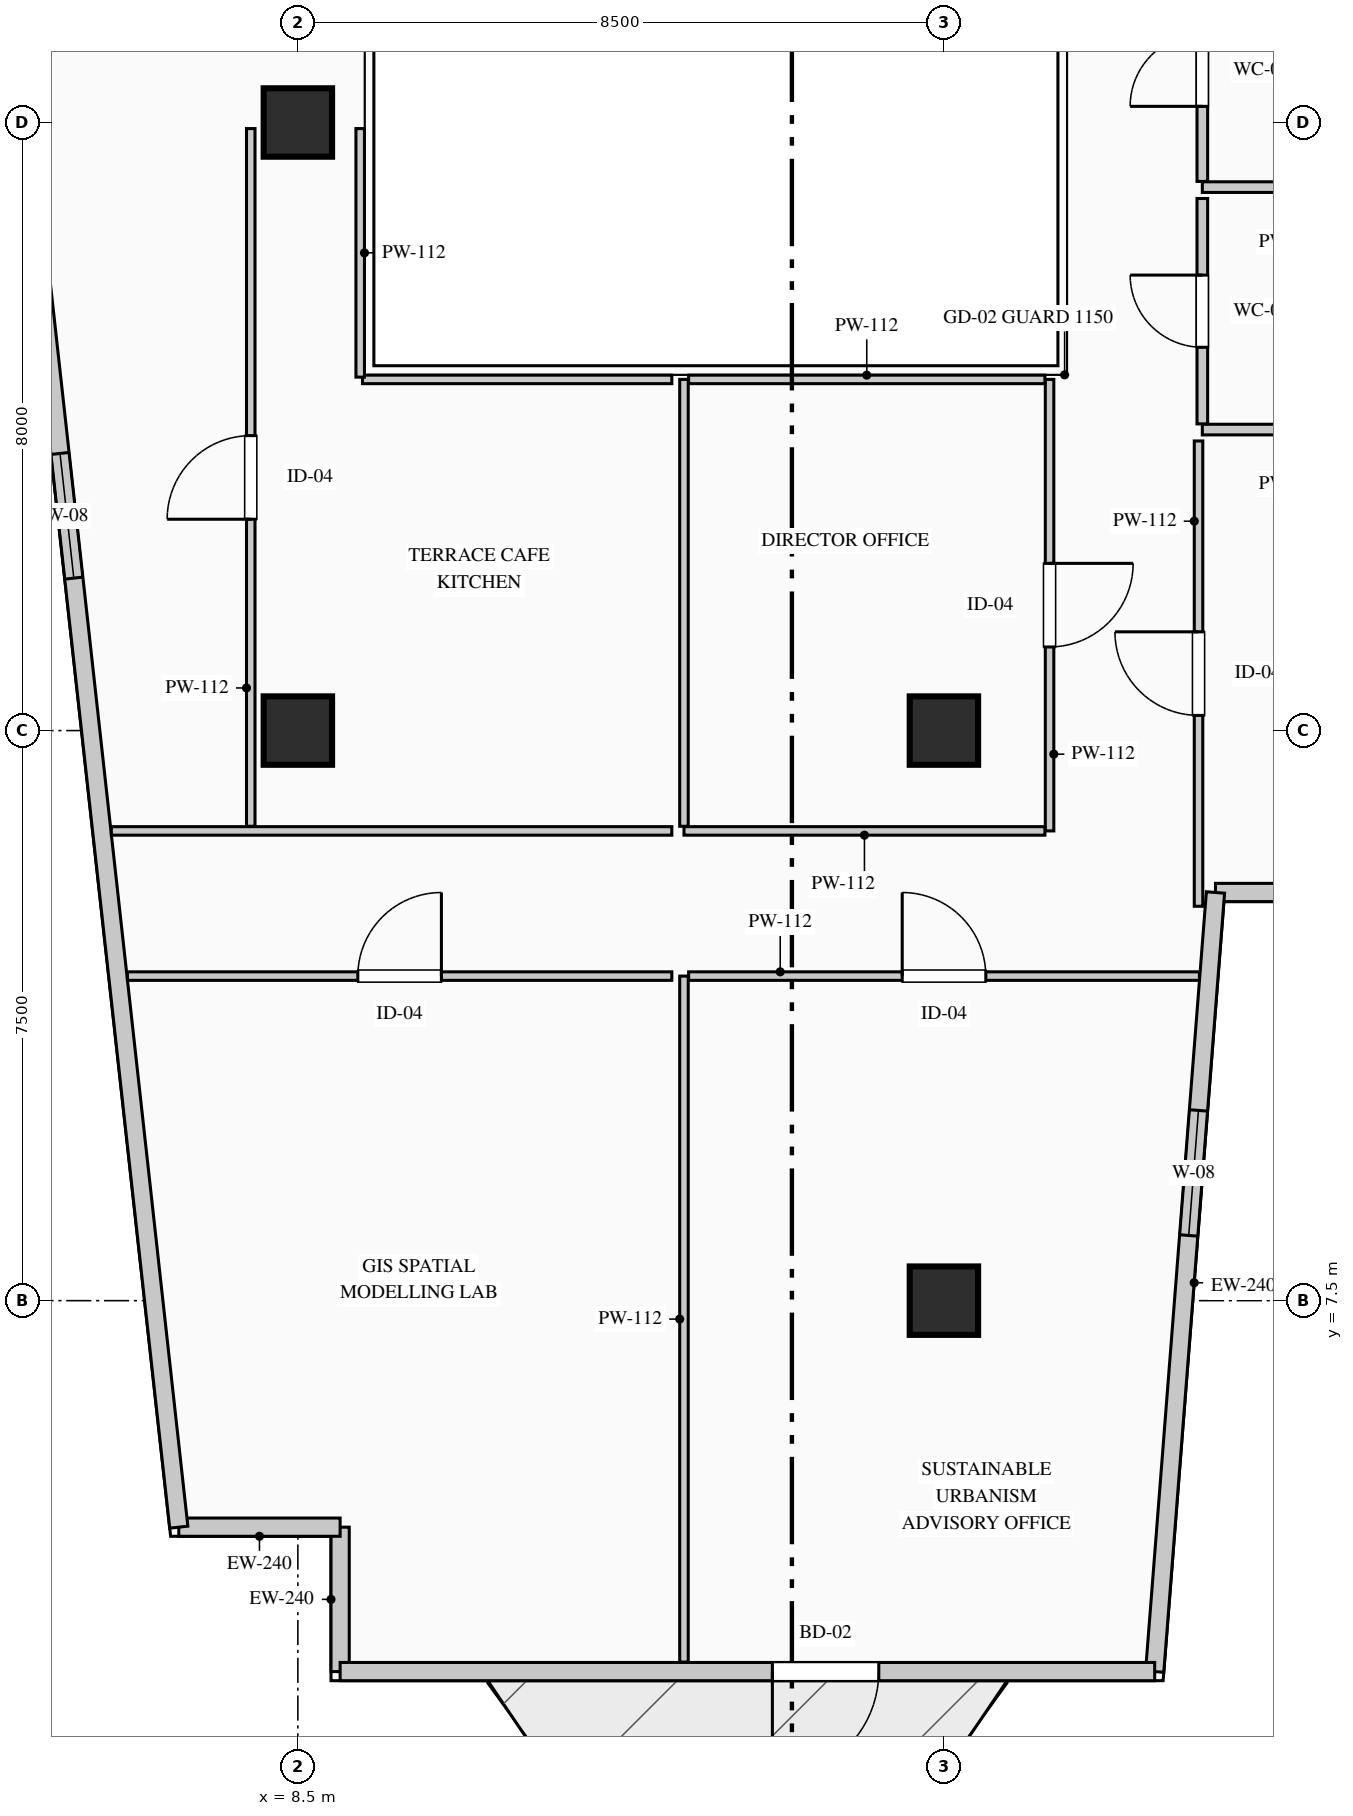
"""IFC4 building model, lengths in metres.
Left out: names, types, materials, properties, quantities, classifications, styles, units other than length and angle.
Written with IfcOpenShell. Run it as: python <this file> out.ifc"""

import sys

from ifc_helpers import new_model, si_unit, direction, frame, frame_2d, origin, origin_2d, place, context, subcontext, project, spatial, rectangle, extrude, element, fill, save


model = new_model("IFC4")
c1 = context("Model", 3, precision=1e-05, world=origin(), true_north=direction((0.0, 1.0)))
c2 = subcontext(c1, "Body", "Model", "MODEL_VIEW")
j1 = project(units=[si_unit("LENGTHUNIT", "METRE"), si_unit("PLANEANGLEUNIT", "RADIAN")], contexts=[c1])
p1 = place(None, origin())
s1 = spatial("IfcSite", under=j1, at=p1, CompositionType="ELEMENT")
p2 = place(p1, origin())
s2 = spatial("IfcBuilding", under=s1, at=p2, CompositionType="ELEMENT")
p3 = place(p2, frame((0.0, 0.0, 246.95)))
s3 = spatial("IfcBuildingStorey", under=s2, at=p3, CompositionType="ELEMENT", Elevation=246.95)
for number, where, z_axis, x_axis in (
    (1, (8.5, 15.0, 0.0), (0.0, 0.0, 1.0), (1.0, 0.0, 0.0)),
    (2, (8.5, 23.0, 0.0), (0.0, 0.0, 1.0), (1.0, 0.0, 0.0)),
    (3, (17.0, 7.5, 0.0), (0.0, 0.0, 1.0), (1.0, 0.0, 0.0)),
    (4, (17.0, 15.0, 0.0), (0.0, 0.0, 1.0), (1.0, 0.0, 0.0)),
):
    element("IfcColumn", number, at=place(p3, frame(where, z_axis=z_axis, x_axis=x_axis)), inside=s3, PredefinedType="COLUMN", context=c2, shape_type="SweptSolid", body=[
        extrude(rectangle(XDim=0.9, YDim=0.9, at=origin_2d()), origin(), (0.0, 0.0, 1.0), 3.95),
    ])
p4 = place(p3, frame((9.056, 2.62, 0.0), z_axis=(0.0, 0.0, 1.0), x_axis=(0.0, 1.0, 0.0)))
e5 = element("IfcWall", 5, at=p4, inside=s3, PredefinedType="STANDARD", context=c2, shape_type="SweptSolid", body=[
    extrude(rectangle(XDim=1.9, YDim=0.24, at=frame_2d((0.95, 0.0))), origin(), (0.0, 0.0, 1.0), 3.6),
])
p5 = place(p3, frame((9.056, 4.52, 0.0), z_axis=(0.0, 0.0, 1.0), x_axis=(-1.0, 0.0, 0.0)))
e6 = element("IfcWall", 6, at=p5, inside=s3, PredefinedType="STANDARD", context=c2, shape_type="SweptSolid", body=[
    extrude(rectangle(XDim=2.123, YDim=0.24, at=frame_2d((1.061, 0.0))), origin(), (0.0, 0.0, 1.0), 3.6),
])
p6 = place(p3, frame((6.933, 4.52, 0.0), z_axis=(0.0, 0.0, 1.0), x_axis=(-0.109965284523, 0.993935428587, 0.0)))
e7 = element("IfcWall", 7, at=p6, inside=s3, PredefinedType="STANDARD", context=c2, shape_type="SweptSolid", body=[
    extrude(rectangle(XDim=37.186, YDim=0.24, at=frame_2d((18.593, 0.0))), origin(), (0.0, 0.0, 1.0), 3.6),
])
p7 = place(p6, frame((12.562, 0.0, 0.9)))
e8 = element("IfcOpeningElement", 8, at=p7, cuts=e7, PredefinedType="OPENING", context=c2, shape_type="SweptSolid", body=[
    extrude(rectangle(XDim=1.65, YDim=1.95, at=frame_2d((0.825, 0.975))), frame((0.0, 0.13, 0.0), z_axis=(0.0, -1.0, 0.0), x_axis=(1.0, 0.0, 0.0)), (0.0, 0.0, 1.0), 0.26),
])
p8 = place(p3, frame((26.495, 12.87, 0.0), z_axis=(0.0, 0.0, 1.0), x_axis=(-1.0, 0.0, 0.0)))
e9 = element("IfcWall", 9, at=p8, inside=s3, PredefinedType="STANDARD", context=c2, shape_type="SweptSolid", body=[
    extrude(rectangle(XDim=5.922, YDim=0.24, at=frame_2d((2.961, 0.0))), origin(), (0.0, 0.0, 1.0), 3.6),
])
p9 = place(p3, frame((20.573, 12.87, 0.0), z_axis=(0.0, 0.0, 1.0), x_axis=(-0.077816860153, -0.996967670627, 0.0)))
e10 = element("IfcWall", 10, at=p9, inside=s3, PredefinedType="STANDARD", context=c2, shape_type="SweptSolid", body=[
    extrude(rectangle(XDim=10.281, YDim=0.24, at=frame_2d((5.141, 0.0))), origin(), (0.0, 0.0, 1.0), 3.6),
])
p10 = place(p9, frame((2.876, 0.0, 0.9)))
e11 = element("IfcOpeningElement", 11, at=p10, cuts=e10, PredefinedType="OPENING", context=c2, shape_type="SweptSolid", body=[
    extrude(rectangle(XDim=1.65, YDim=1.95, at=frame_2d((0.825, 0.975))), frame((0.0, 0.13, 0.0), z_axis=(0.0, -1.0, 0.0), x_axis=(1.0, 0.0, 0.0)), (0.0, 0.0, 1.0), 0.26),
])
p11 = place(p3, frame((19.773, 2.62, 0.0), z_axis=(0.0, 0.0, 1.0), x_axis=(-1.0, 0.0, 0.0)))
e12 = element("IfcWall", 12, at=p11, inside=s3, PredefinedType="STANDARD", context=c2, shape_type="SweptSolid", body=[
    extrude(rectangle(XDim=10.717, YDim=0.24, at=frame_2d((5.358, 0.0))), origin(), (0.0, 0.0, 1.0), 3.6),
])
p12 = place(p11, frame((3.63, 0.0, 0.0)))
e13 = element("IfcOpeningElement", 13, at=p12, cuts=e12, PredefinedType="OPENING", context=c2, shape_type="SweptSolid", body=[
    extrude(rectangle(XDim=1.4, YDim=2.2, at=frame_2d((0.7, 1.1))), frame((0.0, 0.13, 0.0), z_axis=(0.0, -1.0, 0.0), x_axis=(1.0, 0.0, 0.0)), (0.0, 0.0, 1.0), 0.26),
])
p13 = place(p3, frame((22.725, 22.15, 0.0), z_axis=(0.0, 0.0, 1.0), x_axis=(-1.0, 0.0, 0.0)))
e14 = element("IfcWall", 14, at=p13, inside=s3, PredefinedType="PARTITIONING", context=c2, shape_type="SweptSolid", body=[
    extrude(rectangle(XDim=2.325, YDim=0.14, at=frame_2d((1.163, 0.0))), origin(), (0.0, 0.0, 1.0), 3.6),
])
p14 = place(p3, frame((20.4, 22.225, 0.0), z_axis=(0.0, 0.0, 1.0), x_axis=(0.0, 1.0, 0.0)))
e15 = element("IfcWall", 15, at=p14, inside=s3, PredefinedType="PARTITIONING", context=c2, shape_type="SweptSolid", body=[
    extrude(rectangle(XDim=2.925, YDim=0.14, at=frame_2d((1.462, 0.0))), origin(), (0.0, 0.0, 1.0), 3.6),
])
p15 = place(p14, frame((0.988, 0.0, 0.0)))
e16 = element("IfcOpeningElement", 16, at=p15, cuts=e15, PredefinedType="OPENING", context=c2, shape_type="SweptSolid", body=[
    extrude(rectangle(XDim=0.95, YDim=2.15, at=frame_2d((0.475, 1.075))), frame((0.0, 0.08, 0.0), z_axis=(0.0, -1.0, 0.0), x_axis=(1.0, 0.0, 0.0)), (0.0, 0.0, 1.0), 0.16),
])
p16 = place(p3, frame((22.725, 18.96, 0.0), z_axis=(0.0, 0.0, 1.0), x_axis=(-1.0, 0.0, 0.0)))
e17 = element("IfcWall", 17, at=p16, inside=s3, PredefinedType="PARTITIONING", context=c2, shape_type="SweptSolid", body=[
    extrude(rectangle(XDim=2.325, YDim=0.14, at=frame_2d((1.163, 0.0))), origin(), (0.0, 0.0, 1.0), 3.6),
])
p17 = place(p3, frame((20.4, 19.035, 0.0), z_axis=(0.0, 0.0, 1.0), x_axis=(0.0, 1.0, 0.0)))
e18 = element("IfcWall", 18, at=p17, inside=s3, PredefinedType="PARTITIONING", context=c2, shape_type="SweptSolid", body=[
    extrude(rectangle(XDim=2.965, YDim=0.14, at=frame_2d((1.482, 0.0))), origin(), (0.0, 0.0, 1.0), 3.6),
])
p18 = place(p17, frame((1.008, 0.0, 0.0)))
e19 = element("IfcOpeningElement", 19, at=p18, cuts=e18, PredefinedType="OPENING", context=c2, shape_type="SweptSolid", body=[
    extrude(rectangle(XDim=0.95, YDim=2.15, at=frame_2d((0.475, 1.075))), frame((0.0, 0.08, 0.0), z_axis=(0.0, -1.0, 0.0), x_axis=(1.0, 0.0, 0.0)), (0.0, 0.0, 1.0), 0.16),
])
p19 = place(p3, frame((13.58, 2.745, 0.0), z_axis=(0.0, 0.0, 1.0), x_axis=(0.0, 1.0, 0.0)))
e20 = element("IfcWall", 20, at=p19, inside=s3, PredefinedType="PARTITIONING", context=c2, shape_type="SweptSolid", body=[
    extrude(rectangle(XDim=9.025, YDim=0.112, at=frame_2d((4.512, 0.0))), origin(), (0.0, 0.0, 1.0), 3.6),
])
p20 = place(p3, frame((13.641, 11.77, 0.0), z_axis=(0.0, 0.0, 1.0), x_axis=(1.0, 0.0, 0.0)))
e21 = element("IfcWall", 21, at=p20, inside=s3, PredefinedType="PARTITIONING", context=c2, shape_type="SweptSolid", body=[
    extrude(rectangle(XDim=6.721, YDim=0.112, at=frame_2d((3.36, 0.0))), origin(), (0.0, 0.0, 1.0), 3.6),
])
p21 = place(p20, frame((2.81, 0.0, 0.0)))
e22 = element("IfcOpeningElement", 22, at=p21, cuts=e21, PredefinedType="OPENING", context=c2, shape_type="SweptSolid", body=[
    extrude(rectangle(XDim=1.1, YDim=2.2, at=frame_2d((0.55, 1.1))), frame((0.0, 0.066, 0.0), z_axis=(0.0, -1.0, 0.0), x_axis=(1.0, 0.0, 0.0)), (0.0, 0.0, 1.0), 0.132),
])
p22 = place(p3, frame((6.257, 11.77, 0.0), z_axis=(0.0, 0.0, 1.0), x_axis=(1.0, 0.0, 0.0)))
e23 = element("IfcWall", 23, at=p22, inside=s3, PredefinedType="PARTITIONING", context=c2, shape_type="SweptSolid", body=[
    extrude(rectangle(XDim=7.163, YDim=0.112, at=frame_2d((3.582, 0.0))), origin(), (0.0, 0.0, 1.0), 3.6),
])
p23 = place(p22, frame((3.031, 0.0, 0.0)))
e24 = element("IfcOpeningElement", 24, at=p23, cuts=e23, PredefinedType="OPENING", context=c2, shape_type="SweptSolid", body=[
    extrude(rectangle(XDim=1.1, YDim=2.2, at=frame_2d((0.55, 1.1))), frame((0.0, 0.066, 0.0), z_axis=(0.0, -1.0, 0.0), x_axis=(1.0, 0.0, 0.0)), (0.0, 0.0, 1.0), 0.132),
])
p24 = place(p3, frame((18.39, 19.62, 0.0), z_axis=(0.0, 0.0, 1.0), x_axis=(0.0, -1.0, 0.0)))
e25 = element("IfcWall", 25, at=p24, inside=s3, PredefinedType="PARTITIONING", context=c2, shape_type="SweptSolid", body=[
    extrude(rectangle(XDim=5.94, YDim=0.112, at=frame_2d((2.97, 0.0))), origin(), (0.0, 0.0, 1.0), 3.6),
])
p25 = place(p24, frame((2.42, 0.0, 0.0)))
e26 = element("IfcOpeningElement", 26, at=p25, cuts=e25, PredefinedType="OPENING", context=c2, shape_type="SweptSolid", body=[
    extrude(rectangle(XDim=1.1, YDim=2.2, at=frame_2d((0.55, 1.1))), frame((0.0, 0.066, 0.0), z_axis=(0.0, -1.0, 0.0), x_axis=(1.0, 0.0, 0.0)), (0.0, 0.0, 1.0), 0.132),
])
p26 = place(p3, frame((18.329, 13.68, 0.0), z_axis=(0.0, 0.0, 1.0), x_axis=(-1.0, 0.0, 0.0)))
e27 = element("IfcWall", 27, at=p26, inside=s3, PredefinedType="PARTITIONING", context=c2, shape_type="SweptSolid", body=[
    extrude(rectangle(XDim=4.749, YDim=0.112, at=frame_2d((2.375, 0.0))), origin(), (0.0, 0.0, 1.0), 3.6),
])
p27 = place(p3, frame((13.58, 13.741, 0.0), z_axis=(0.0, 0.0, 1.0), x_axis=(0.0, 1.0, 0.0)))
e28 = element("IfcWall", 28, at=p27, inside=s3, PredefinedType="PARTITIONING", context=c2, shape_type="SweptSolid", body=[
    extrude(rectangle(XDim=5.879, YDim=0.112, at=frame_2d((2.939, 0.0))), origin(), (0.0, 0.0, 1.0), 3.6),
])
p28 = place(p3, frame((13.641, 19.62, 0.0), z_axis=(0.0, 0.0, 1.0), x_axis=(1.0, 0.0, 0.0)))
e29 = element("IfcWall", 29, at=p28, inside=s3, PredefinedType="PARTITIONING", context=c2, shape_type="SweptSolid", body=[
    extrude(rectangle(XDim=4.688, YDim=0.112, at=frame_2d((2.344, 0.0))), origin(), (0.0, 0.0, 1.0), 3.6),
])
p29 = place(p3, frame((20.35, 12.689, 0.0), z_axis=(0.0, 0.0, 1.0), x_axis=(0.0, 1.0, 0.0)))
e30 = element("IfcWall", 30, at=p29, inside=s3, PredefinedType="PARTITIONING", context=c2, shape_type="SweptSolid", body=[
    extrude(rectangle(XDim=6.121, YDim=0.112, at=frame_2d((3.061, 0.0))), origin(), (0.0, 0.0, 1.0), 3.6),
])
p30 = place(p29, frame((2.511, 0.0, 0.0)))
e31 = element("IfcOpeningElement", 31, at=p30, cuts=e30, PredefinedType="OPENING", context=c2, shape_type="SweptSolid", body=[
    extrude(rectangle(XDim=1.1, YDim=2.2, at=frame_2d((0.55, 1.1))), frame((0.0, 0.066, 0.0), z_axis=(0.0, -1.0, 0.0), x_axis=(1.0, 0.0, 0.0)), (0.0, 0.0, 1.0), 0.132),
])
p31 = place(p3, frame((9.35, 19.62, 0.0), z_axis=(0.0, 0.0, 1.0), x_axis=(1.0, 0.0, 0.0)))
e32 = element("IfcWall", 32, at=p31, inside=s3, PredefinedType="PARTITIONING", context=c2, shape_type="SweptSolid", body=[
    extrude(rectangle(XDim=4.07, YDim=0.112, at=frame_2d((2.035, 0.0))), origin(), (0.0, 0.0, 1.0), 3.6),
])
p32 = place(p3, frame((13.42, 13.68, 0.0), z_axis=(0.0, 0.0, 1.0), x_axis=(-1.0, 0.0, 0.0)))
e33 = element("IfcWall", 33, at=p32, inside=s3, PredefinedType="PARTITIONING", context=c2, shape_type="SweptSolid", body=[
    extrude(rectangle(XDim=7.374, YDim=0.112, at=frame_2d((3.687, 0.0))), origin(), (0.0, 0.0, 1.0), 3.6),
])
p33 = place(p3, frame((7.88, 13.741, 0.0), z_axis=(0.0, 0.0, 1.0), x_axis=(0.0, 1.0, 0.0)))
e34 = element("IfcWall", 34, at=p33, inside=s3, PredefinedType="PARTITIONING", context=c2, shape_type="SweptSolid", body=[
    extrude(rectangle(XDim=9.179, YDim=0.112, at=frame_2d((4.589, 0.0))), origin(), (0.0, 0.0, 1.0), 3.6),
])
p34 = place(p33, frame((4.04, 0.0, 0.0)))
e35 = element("IfcOpeningElement", 35, at=p34, cuts=e34, PredefinedType="OPENING", context=c2, shape_type="SweptSolid", body=[
    extrude(rectangle(XDim=1.1, YDim=2.2, at=frame_2d((0.55, 1.1))), frame((0.0, 0.066, 0.0), z_axis=(0.0, -1.0, 0.0), x_axis=(1.0, 0.0, 0.0)), (0.0, 0.0, 1.0), 0.132),
])
p35 = place(p3, frame((9.32, 22.92, 0.0), z_axis=(0.0, 0.0, 1.0), x_axis=(0.0, -1.0, 0.0)))
e36 = element("IfcWall", 36, at=p35, inside=s3, PredefinedType="PARTITIONING", context=c2, shape_type="SweptSolid", body=[
    extrude(rectangle(XDim=3.27, YDim=0.112, at=frame_2d((1.635, 0.0))), origin(), (0.0, 0.0, 1.0), 3.285),
])
p36 = place(p7, origin())
e37 = element("IfcWindow", 37, at=p36, inside=s3, PartitioningType="SINGLE_PANEL", PredefinedType="WINDOW", context=c2, shape_type="SweptSolid", body=[
    extrude(rectangle(XDim=1.65, YDim=1.95, at=frame_2d((0.825, 0.975))), frame((0.0, 0.03, 0.0), z_axis=(0.0, -1.0, 0.0), x_axis=(1.0, 0.0, 0.0)), (0.0, 0.0, 1.0), 0.06),
])
fill(e8, e37)
p37 = place(p10, origin())
e38 = element("IfcWindow", 38, at=p37, inside=s3, PartitioningType="SINGLE_PANEL", PredefinedType="WINDOW", context=c2, shape_type="SweptSolid", body=[
    extrude(rectangle(XDim=1.65, YDim=1.95, at=frame_2d((0.825, 0.975))), frame((0.0, 0.03, 0.0), z_axis=(0.0, -1.0, 0.0), x_axis=(1.0, 0.0, 0.0)), (0.0, 0.0, 1.0), 0.06),
])
fill(e11, e38)
p38 = place(p12, origin())
e39 = element("IfcDoor", 39, at=p38, inside=s3, OperationType="SINGLE_SWING_RIGHT", PredefinedType="DOOR", context=c2, shape_type="SweptSolid", body=[
    extrude(rectangle(XDim=1.4, YDim=2.2, at=frame_2d((0.7, 1.1))), frame((0.0, 0.025, 0.0), z_axis=(0.0, -1.0, 0.0), x_axis=(1.0, 0.0, 0.0)), (0.0, 0.0, 1.0), 0.05),
])
fill(e13, e39)
p39 = place(p15, origin())
e40 = element("IfcDoor", 40, at=p39, inside=s3, OperationType="SINGLE_SWING_LEFT", PredefinedType="DOOR", context=c2, shape_type="SweptSolid", body=[
    extrude(rectangle(XDim=0.95, YDim=2.15, at=frame_2d((0.475, 1.075))), frame((0.0, 0.025, 0.0), z_axis=(0.0, -1.0, 0.0), x_axis=(1.0, 0.0, 0.0)), (0.0, 0.0, 1.0), 0.05),
])
fill(e16, e40)
p40 = place(p18, origin())
e41 = element("IfcDoor", 41, at=p40, inside=s3, OperationType="SINGLE_SWING_RIGHT", PredefinedType="DOOR", context=c2, shape_type="SweptSolid", body=[
    extrude(rectangle(XDim=0.95, YDim=2.15, at=frame_2d((0.475, 1.075))), frame((0.0, 0.025, 0.0), z_axis=(0.0, -1.0, 0.0), x_axis=(1.0, 0.0, 0.0)), (0.0, 0.0, 1.0), 0.05),
])
fill(e19, e41)
p41 = place(p21, origin())
e42 = element("IfcDoor", 42, at=p41, inside=s3, OperationType="SINGLE_SWING_LEFT", PredefinedType="DOOR", context=c2, shape_type="SweptSolid", body=[
    extrude(rectangle(XDim=1.1, YDim=2.2, at=frame_2d((0.55, 1.1))), frame((0.0, 0.025, 0.0), z_axis=(0.0, -1.0, 0.0), x_axis=(1.0, 0.0, 0.0)), (0.0, 0.0, 1.0), 0.05),
])
fill(e22, e42)
p42 = place(p23, origin())
e43 = element("IfcDoor", 43, at=p42, inside=s3, OperationType="SINGLE_SWING_RIGHT", PredefinedType="DOOR", context=c2, shape_type="SweptSolid", body=[
    extrude(rectangle(XDim=1.1, YDim=2.2, at=frame_2d((0.55, 1.1))), frame((0.0, 0.025, 0.0), z_axis=(0.0, -1.0, 0.0), x_axis=(1.0, 0.0, 0.0)), (0.0, 0.0, 1.0), 0.05),
])
fill(e24, e43)
p43 = place(p25, origin())
e44 = element("IfcDoor", 44, at=p43, inside=s3, OperationType="SINGLE_SWING_LEFT", PredefinedType="DOOR", context=c2, shape_type="SweptSolid", body=[
    extrude(rectangle(XDim=1.1, YDim=2.2, at=frame_2d((0.55, 1.1))), frame((0.0, 0.025, 0.0), z_axis=(0.0, -1.0, 0.0), x_axis=(1.0, 0.0, 0.0)), (0.0, 0.0, 1.0), 0.05),
])
fill(e26, e44)
p44 = place(p30, origin())
e45 = element("IfcDoor", 45, at=p44, inside=s3, OperationType="SINGLE_SWING_RIGHT", PredefinedType="DOOR", context=c2, shape_type="SweptSolid", body=[
    extrude(rectangle(XDim=1.1, YDim=2.2, at=frame_2d((0.55, 1.1))), frame((0.0, 0.025, 0.0), z_axis=(0.0, -1.0, 0.0), x_axis=(1.0, 0.0, 0.0)), (0.0, 0.0, 1.0), 0.05),
])
fill(e31, e45)
p45 = place(p34, origin())
e46 = element("IfcDoor", 46, at=p45, inside=s3, OperationType="SINGLE_SWING_LEFT", PredefinedType="DOOR", context=c2, shape_type="SweptSolid", body=[
    extrude(rectangle(XDim=1.1, YDim=2.2, at=frame_2d((0.55, 1.1))), frame((0.0, 0.025, 0.0), z_axis=(0.0, -1.0, 0.0), x_axis=(1.0, 0.0, 0.0)), (0.0, 0.0, 1.0), 0.05),
])
fill(e35, e46)
save(model, sys.argv[1])
